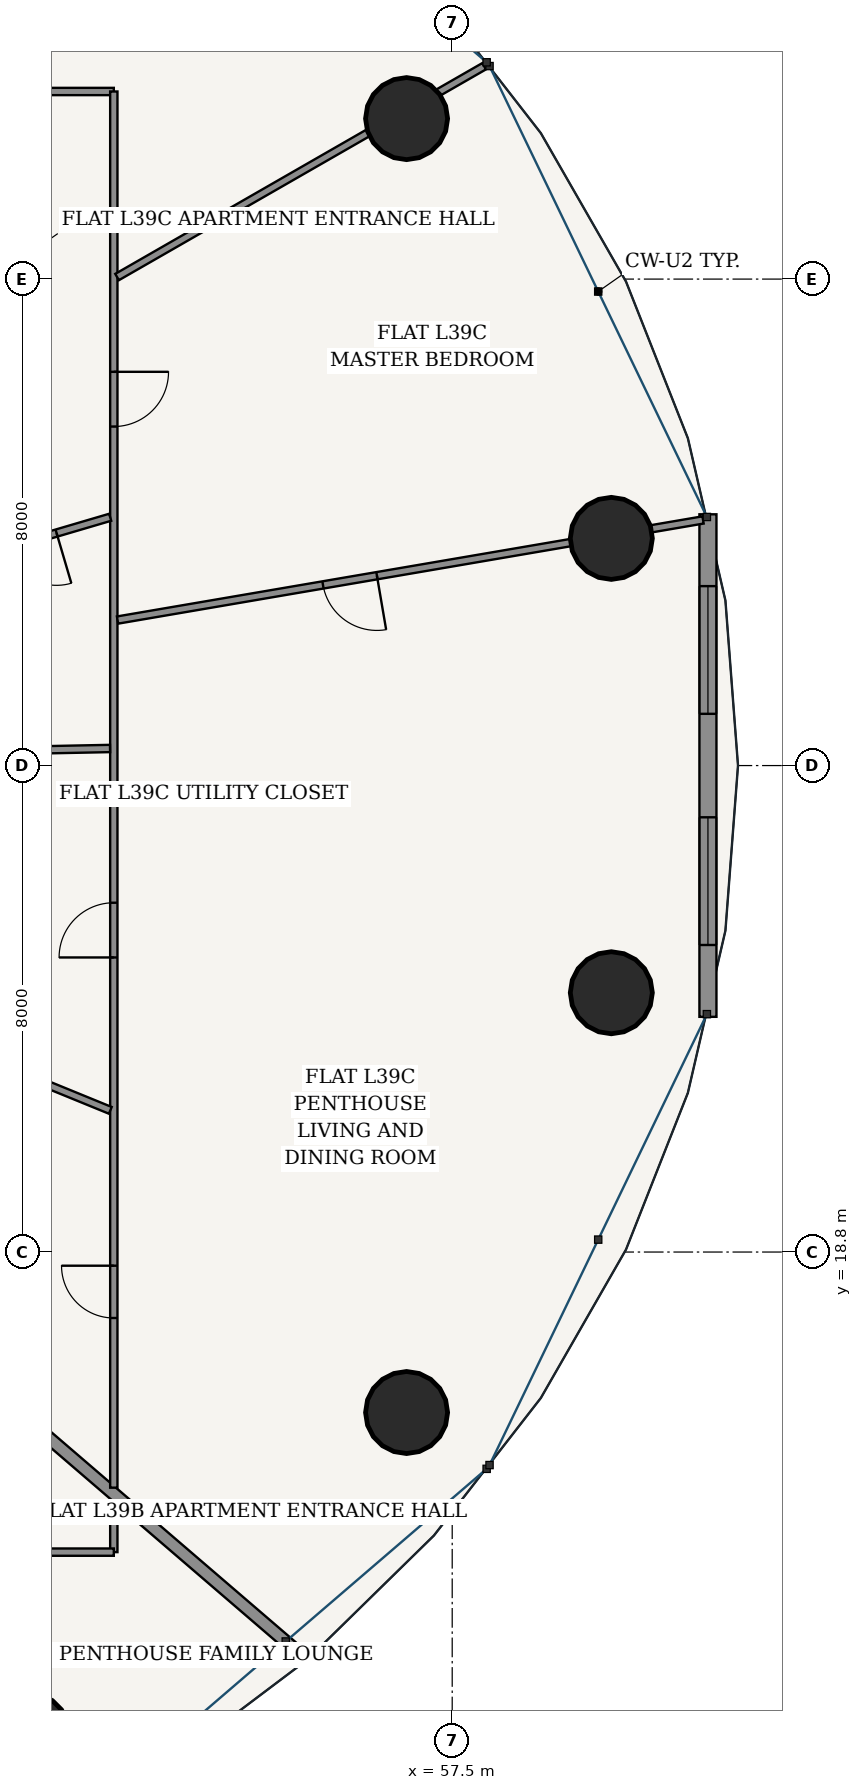
"""IFC4 building model, lengths in metres.
Left out: names, types, materials, properties, quantities, classifications, styles, units other than length and angle.
Written with IfcOpenShell. Run it as: python <this file> out.ifc"""

import sys

from ifc_helpers import new_model, si_unit, direction, frame, frame_2d, origin, origin_2d, place, context, subcontext, project, spatial, rectangle, hollow_circle, extrude, source, transform, mapped, element, fill, save


model = new_model("IFC4")
c1 = context("Model", 3, precision=1e-05, world=origin(), true_north=direction((-0.2419218956, 0.970295726276)))
c2 = subcontext(c1, "Body", "Model", "MODEL_VIEW")
j1 = project(units=[si_unit("LENGTHUNIT", "METRE"), si_unit("PLANEANGLEUNIT", "RADIAN")], contexts=[c1])
p1 = place(None, origin())
s1 = spatial("IfcSite", under=j1, at=p1, CompositionType="ELEMENT")
p2 = place(p1, origin())
s2 = spatial("IfcBuilding", under=s1, at=p2, CompositionType="ELEMENT")
p3 = place(p2, frame((0.0, 0.0, 149.8)))
s3 = spatial("IfcBuildingStorey", under=s2, at=p3, CompositionType="ELEMENT", Elevation=149.8)
for number, where, z_axis, x_axis in (
    (1, (60.117, 30.536, 0.0), (0.0, 0.0, 1.0), (1.0, 0.0, 0.0)),
    (2, (56.75, 37.439, 0.0), (0.0, 0.0, 1.0), (1.0, 0.0, 0.0)),
    (3, (50.528, 10.877, 0.0), (0.0, 0.0, 1.0), (1.0, 0.0, 0.0)),
    (4, (56.75, 16.161, 0.0), (0.0, 0.0, 1.0), (1.0, 0.0, 0.0)),
    (5, (60.117, 23.064, 0.0), (0.0, 0.0, 1.0), (1.0, 0.0, 0.0)),
):
    element("IfcColumn", number, at=place(p3, frame(where, z_axis=z_axis, x_axis=x_axis)), inside=s3, PredefinedType="COLUMN", context=c2, shape_type="SweptSolid", body=[
        extrude(hollow_circle(Radius=0.675, WallThickness=0.042, at=origin_2d()), origin(), (0.0, 0.0, 1.0), 3.6),
    ])
p4 = place(p3, frame((61.706, 22.668, 0.0), z_axis=(0.0, 0.0, 1.0), x_axis=(0.0, 1.0, 0.0)))
e6 = element("IfcWall", 6, at=p4, inside=s3, PredefinedType="SOLIDWALL", context=c2, shape_type="SweptSolid", body=[
    extrude(rectangle(XDim=8.264, YDim=0.28, at=frame_2d((4.132, 0.0))), origin(), (0.0, 0.0, 1.0), 3.33),
])
p5 = place(p4, frame((1.181, 0.0, 0.85)))
e7 = element("IfcOpeningElement", 7, at=p5, cuts=e6, PredefinedType="OPENING", context=c2, shape_type="SweptSolid", body=[
    extrude(rectangle(XDim=2.1, YDim=1.95, at=frame_2d((1.05, 0.975))), frame((0.0, 0.15, 0.0), z_axis=(0.0, -1.0, 0.0), x_axis=(1.0, 0.0, 0.0)), (0.0, 0.0, 1.0), 0.3),
])
p6 = place(p4, frame((4.983, 0.0, 0.85)))
e8 = element("IfcOpeningElement", 8, at=p6, cuts=e6, PredefinedType="OPENING", context=c2, shape_type="SweptSolid", body=[
    extrude(rectangle(XDim=2.1, YDim=1.95, at=frame_2d((1.05, 0.975))), frame((0.0, 0.15, 0.0), z_axis=(0.0, -1.0, 0.0), x_axis=(1.0, 0.0, 0.0)), (0.0, 0.0, 1.0), 0.3),
])
p7 = place(p3, frame((51.935, 14.721, 0.0), z_axis=(0.0, 0.0, 1.0), x_axis=(0.0, -1.0, 0.0)))
e9 = element("IfcWall", 9, at=p7, inside=s3, PredefinedType="PARTITIONING", context=c2, shape_type="SweptSolid", body=[
    extrude(rectangle(XDim=0.856, YDim=0.12, at=frame_2d((0.428, 0.0))), origin(), (0.0, 0.0, 1.0), 3.33),
])
p8 = place(p3, frame((51.935, 13.865, 0.0), z_axis=(0.0, 0.0, 1.0), x_axis=(-1.0, 0.0, 0.0)))
e10 = element("IfcWall", 10, at=p8, inside=s3, PredefinedType="PARTITIONING", context=c2, shape_type="SweptSolid", body=[
    extrude(rectangle(XDim=20.345, YDim=0.12, at=frame_2d((10.172, 0.0))), origin(), (0.0, 0.0, 1.0), 2.776),
])
p9 = place(p8, frame((2.985, 0.0, 0.0)))
e11 = element("IfcOpeningElement", 11, at=p9, cuts=e10, PredefinedType="OPENING", context=c2, shape_type="SweptSolid", body=[
    extrude(rectangle(XDim=0.9, YDim=2.15, at=frame_2d((0.45, 1.075))), frame((0.0, 0.07, 0.0), z_axis=(0.0, -1.0, 0.0), x_axis=(1.0, 0.0, 0.0)), (0.0, 0.0, 1.0), 0.14),
])
p10 = place(p8, frame((12.333, 0.0, 0.0)))
e12 = element("IfcOpeningElement", 12, at=p10, cuts=e10, PredefinedType="OPENING", context=c2, shape_type="SweptSolid", body=[
    extrude(rectangle(XDim=0.9, YDim=2.15, at=frame_2d((0.45, 1.075))), frame((0.0, 0.07, 0.0), z_axis=(0.0, -1.0, 0.0), x_axis=(1.0, 0.0, 0.0)), (0.0, 0.0, 1.0), 0.14),
])
p11 = place(p8, frame((18.436, 0.0, 0.0)))
e13 = element("IfcOpeningElement", 13, at=p11, cuts=e10, PredefinedType="OPENING", context=c2, shape_type="SweptSolid", body=[
    extrude(rectangle(XDim=0.9, YDim=2.15, at=frame_2d((0.45, 1.075))), frame((0.0, 0.07, 0.0), z_axis=(0.0, -1.0, 0.0), x_axis=(1.0, 0.0, 0.0)), (0.0, 0.0, 1.0), 0.14),
])
p12 = place(p3, frame((49.287, 17.099, 0.0), z_axis=(0.0, 0.0, 1.0), x_axis=(0.758362300646, -0.651833276965, 0.0)))
e14 = element("IfcWall", 14, at=p12, inside=s3, PredefinedType="PARTITIONING", context=c2, shape_type="SweptSolid", body=[
    extrude(rectangle(XDim=7.618, YDim=0.2, at=frame_2d((3.809, 0.0))), origin(), (0.0, 0.0, 1.0), 2.846),
])
p13 = place(p3, frame((44.465, 37.885, 0.0), z_axis=(0.0, 0.0, 1.0), x_axis=(1.0, 0.0, 0.0)))
e15 = element("IfcWall", 15, at=p13, inside=s3, PredefinedType="PARTITIONING", context=c2, shape_type="SweptSolid", body=[
    extrude(rectangle(XDim=7.47, YDim=0.12, at=frame_2d((3.735, 0.0))), origin(), (0.0, 0.0, 1.0), 2.776),
])
p14 = place(p13, frame((0.778, 0.0, 0.0)))
e16 = element("IfcOpeningElement", 16, at=p14, cuts=e15, PredefinedType="OPENING", context=c2, shape_type="SweptSolid", body=[
    extrude(rectangle(XDim=0.9, YDim=2.15, at=frame_2d((0.45, 1.075))), frame((0.0, 0.07, 0.0), z_axis=(0.0, -1.0, 0.0), x_axis=(1.0, 0.0, 0.0)), (0.0, 0.0, 1.0), 0.14),
])
p15 = place(p3, frame((51.935, 37.885, 0.0), z_axis=(0.0, 0.0, 1.0), x_axis=(0.0, -1.0, 0.0)))
e17 = element("IfcWall", 17, at=p15, inside=s3, PredefinedType="PARTITIONING", context=c2, shape_type="SweptSolid", body=[
    extrude(rectangle(XDim=22.96, YDim=0.12, at=frame_2d((11.48, 0.0))), origin(), (0.0, 0.0, 1.0), 2.776),
])
p16 = place(p15, frame((4.61, 0.0, 0.0)))
e18 = element("IfcOpeningElement", 18, at=p16, cuts=e17, PredefinedType="OPENING", context=c2, shape_type="SweptSolid", body=[
    extrude(rectangle(XDim=0.9, YDim=2.15, at=frame_2d((0.45, 1.075))), frame((0.0, 0.07, 0.0), z_axis=(0.0, -1.0, 0.0), x_axis=(1.0, 0.0, 0.0)), (0.0, 0.0, 1.0), 0.14),
])
p17 = place(p15, frame((19.31, 0.0, 0.0)))
e19 = element("IfcOpeningElement", 19, at=p17, cuts=e17, PredefinedType="OPENING", context=c2, shape_type="SweptSolid", body=[
    extrude(rectangle(XDim=0.86, YDim=2.15, at=frame_2d((0.43, 1.075))), frame((0.0, 0.07, 0.0), z_axis=(0.0, -1.0, 0.0), x_axis=(1.0, 0.0, 0.0)), (0.0, 0.0, 1.0), 0.14),
])
p18 = place(p15, frame((13.341, 0.0, 0.0)))
e20 = element("IfcOpeningElement", 20, at=p18, cuts=e17, PredefinedType="OPENING", context=c2, shape_type="SweptSolid", body=[
    extrude(rectangle(XDim=0.9, YDim=2.15, at=frame_2d((0.45, 1.075))), frame((0.0, 0.07, 0.0), z_axis=(0.0, -1.0, 0.0), x_axis=(1.0, 0.0, 0.0)), (0.0, 0.0, 1.0), 0.14),
])
p19 = place(p3, frame((51.996, 29.193, 0.0), z_axis=(0.0, 0.0, 1.0), x_axis=(0.985698378271, 0.168519159369, 0.0)))
e21 = element("IfcWall", 21, at=p19, inside=s3, PredefinedType="PARTITIONING", context=c2, shape_type="SweptSolid", body=[
    extrude(rectangle(XDim=9.769, YDim=0.12, at=frame_2d((4.884, 0.0))), origin(), (0.0, 0.0, 1.0), 2.776),
])
p20 = place(p19, frame((3.428, 0.0, 0.0)))
e22 = element("IfcOpeningElement", 22, at=p20, cuts=e21, PredefinedType="OPENING", context=c2, shape_type="SweptSolid", body=[
    extrude(rectangle(XDim=0.9, YDim=2.15, at=frame_2d((0.45, 1.075))), frame((0.0, 0.07, 0.0), z_axis=(0.0, -1.0, 0.0), x_axis=(1.0, 0.0, 0.0)), (0.0, 0.0, 1.0), 0.14),
])
p21 = place(p3, frame((51.989, 34.834, 0.0), z_axis=(0.0, 0.0, 1.0), x_axis=(0.86717064002, 0.498011125466, 0.0)))
e23 = element("IfcWall", 23, at=p21, inside=s3, PredefinedType="PARTITIONING", context=c2, shape_type="SweptSolid", body=[
    extrude(rectangle(XDim=6.961, YDim=0.12, at=frame_2d((3.48, 0.0))), origin(), (0.0, 0.0, 1.0), 2.776),
])
p22 = place(p3, frame((46.656, 37.934, 0.0), z_axis=(0.0, 0.0, 1.0), x_axis=(0.613758289074, 0.789493991487, 0.0)))
e24 = element("IfcWall", 24, at=p22, inside=s3, PredefinedType="PARTITIONING", context=c2, shape_type="SweptSolid", body=[
    extrude(rectangle(XDim=7.695, YDim=0.12, at=frame_2d((3.848, 0.0))), origin(), (0.0, 0.0, 1.0), 2.776),
])
p23 = place(p22, frame((2.395, 0.0, 0.0)))
e25 = element("IfcOpeningElement", 25, at=p23, cuts=e24, PredefinedType="OPENING", context=c2, shape_type="SweptSolid", body=[
    extrude(rectangle(XDim=0.9, YDim=2.15, at=frame_2d((0.45, 1.075))), frame((0.0, 0.07, 0.0), z_axis=(0.0, -1.0, 0.0), x_axis=(1.0, 0.0, 0.0)), (0.0, 0.0, 1.0), 0.14),
])
p24 = place(p3, frame((49.287, 22.188, 0.0), z_axis=(0.0, 0.0, 1.0), x_axis=(0.925708058909, -0.378238799796, 0.0)))
e26 = element("IfcWall", 26, at=p24, inside=s3, PredefinedType="PARTITIONING", context=c2, shape_type="SweptSolid", body=[
    extrude(rectangle(XDim=2.799, YDim=0.12, at=frame_2d((1.399, 0.0))), origin(), (0.0, 0.0, 1.0), 3.33),
])
p25 = place(p3, frame((49.287, 27.029, 0.0), z_axis=(0.0, 0.0, 1.0), x_axis=(0.999794052369, 0.020294157974, 0.0)))
e27 = element("IfcWall", 27, at=p25, inside=s3, PredefinedType="PARTITIONING", context=c2, shape_type="SweptSolid", body=[
    extrude(rectangle(XDim=2.586, YDim=0.12, at=frame_2d((1.293, 0.0))), origin(), (0.0, 0.0, 1.0), 3.33),
])
p26 = place(p3, frame((49.287, 30.121, 0.0), z_axis=(0.0, 0.0, 1.0), x_axis=(0.959304970846, 0.282372046969, 0.0)))
e28 = element("IfcWall", 28, at=p26, inside=s3, PredefinedType="PARTITIONING", context=c2, shape_type="SweptSolid", body=[
    extrude(rectangle(XDim=2.698, YDim=0.12, at=frame_2d((1.349, 0.0))), origin(), (0.0, 0.0, 1.0), 3.33),
])
p27 = place(p26, frame((0.919, 0.0, 0.0)))
e29 = element("IfcOpeningElement", 29, at=p27, cuts=e28, PredefinedType="OPENING", context=c2, shape_type="SweptSolid", body=[
    extrude(rectangle(XDim=0.86, YDim=2.15, at=frame_2d((0.43, 1.075))), frame((0.0, 0.07, 0.0), z_axis=(0.0, -1.0, 0.0), x_axis=(1.0, 0.0, 0.0)), (0.0, 0.0, 1.0), 0.14),
])
m1 = source(origin(), c2, "Body", "SweptSolid", [
    extrude(rectangle(XDim=2.1, YDim=1.95, at=frame_2d((1.05, 0.975))), frame((0.0, 0.03, 0.0), z_axis=(0.0, -1.0, 0.0), x_axis=(1.0, 0.0, 0.0)), (0.0, 0.0, 1.0), 0.06),
])
p28 = place(p5, origin())
e30 = element("IfcWindow", 30, at=p28, inside=s3, PartitioningType="SINGLE_PANEL", PredefinedType="WINDOW", context=c2, shape_type="MappedRepresentation", body=[
    mapped(m1, transform((0.0, 0.0, 0.0), scale=1.0)),
])
fill(e7, e30)
p29 = place(p6, origin())
e31 = element("IfcWindow", 31, at=p29, inside=s3, PartitioningType="SINGLE_PANEL", PredefinedType="WINDOW", context=c2, shape_type="MappedRepresentation", body=[
    mapped(m1, transform((0.0, 0.0, 0.0), scale=1.0)),
])
fill(e8, e31)
m2 = source(origin(), c2, "Body", "SweptSolid", [
    extrude(rectangle(XDim=0.86, YDim=2.15, at=frame_2d((0.43, 1.075))), frame((0.0, 0.025, 0.0), z_axis=(0.0, -1.0, 0.0), x_axis=(1.0, 0.0, 0.0)), (0.0, 0.0, 1.0), 0.05),
])
p30 = place(p27, frame((0.86, 0.0, 0.0), z_axis=(0.0, 0.0, 1.0), x_axis=(-1.0, 0.0, 0.0)))
e32 = element("IfcDoor", 32, at=p30, inside=s3, OperationType="SINGLE_SWING_LEFT", PredefinedType="DOOR", context=c2, shape_type="MappedRepresentation", body=[
    mapped(m2, transform((0.0, 0.0, 0.0), scale=1.0)),
])
fill(e29, e32)
m3 = source(origin(), c2, "Body", "SweptSolid", [
    extrude(rectangle(XDim=0.9, YDim=2.15, at=frame_2d((0.45, 1.075))), frame((0.0, 0.025, 0.0), z_axis=(0.0, -1.0, 0.0), x_axis=(1.0, 0.0, 0.0)), (0.0, 0.0, 1.0), 0.05),
])
p31 = place(p16, origin())
e33 = element("IfcDoor", 33, at=p31, inside=s3, OperationType="SINGLE_SWING_LEFT", PredefinedType="DOOR", context=c2, shape_type="MappedRepresentation", body=[
    mapped(m3, transform((0.0, 0.0, 0.0), scale=1.0)),
])
fill(e18, e33)
p32 = place(p20, frame((0.9, 0.0, 0.0), z_axis=(0.0, 0.0, 1.0), x_axis=(-1.0, 0.0, 0.0)))
e34 = element("IfcDoor", 34, at=p32, inside=s3, OperationType="SINGLE_SWING_LEFT", PredefinedType="DOOR", context=c2, shape_type="MappedRepresentation", body=[
    mapped(m3, transform((0.0, 0.0, 0.0), scale=1.0)),
])
fill(e22, e34)
p33 = place(p17, frame((0.86, 0.0, 0.0), z_axis=(0.0, 0.0, 1.0), x_axis=(-1.0, 0.0, 0.0)))
e35 = element("IfcDoor", 35, at=p33, inside=s3, OperationType="SINGLE_SWING_RIGHT", PredefinedType="DOOR", context=c2, shape_type="MappedRepresentation", body=[
    mapped(m2, transform((0.0, 0.0, 0.0), scale=1.0)),
])
fill(e19, e35)
p34 = place(p18, frame((0.9, 0.0, 0.0), z_axis=(0.0, 0.0, 1.0), x_axis=(-1.0, 0.0, 0.0)))
e36 = element("IfcDoor", 36, at=p34, inside=s3, OperationType="SINGLE_SWING_LEFT", PredefinedType="DOOR", context=c2, shape_type="MappedRepresentation", body=[
    mapped(m3, transform((0.0, 0.0, 0.0), scale=1.0)),
])
fill(e20, e36)
save(model, sys.argv[1])
